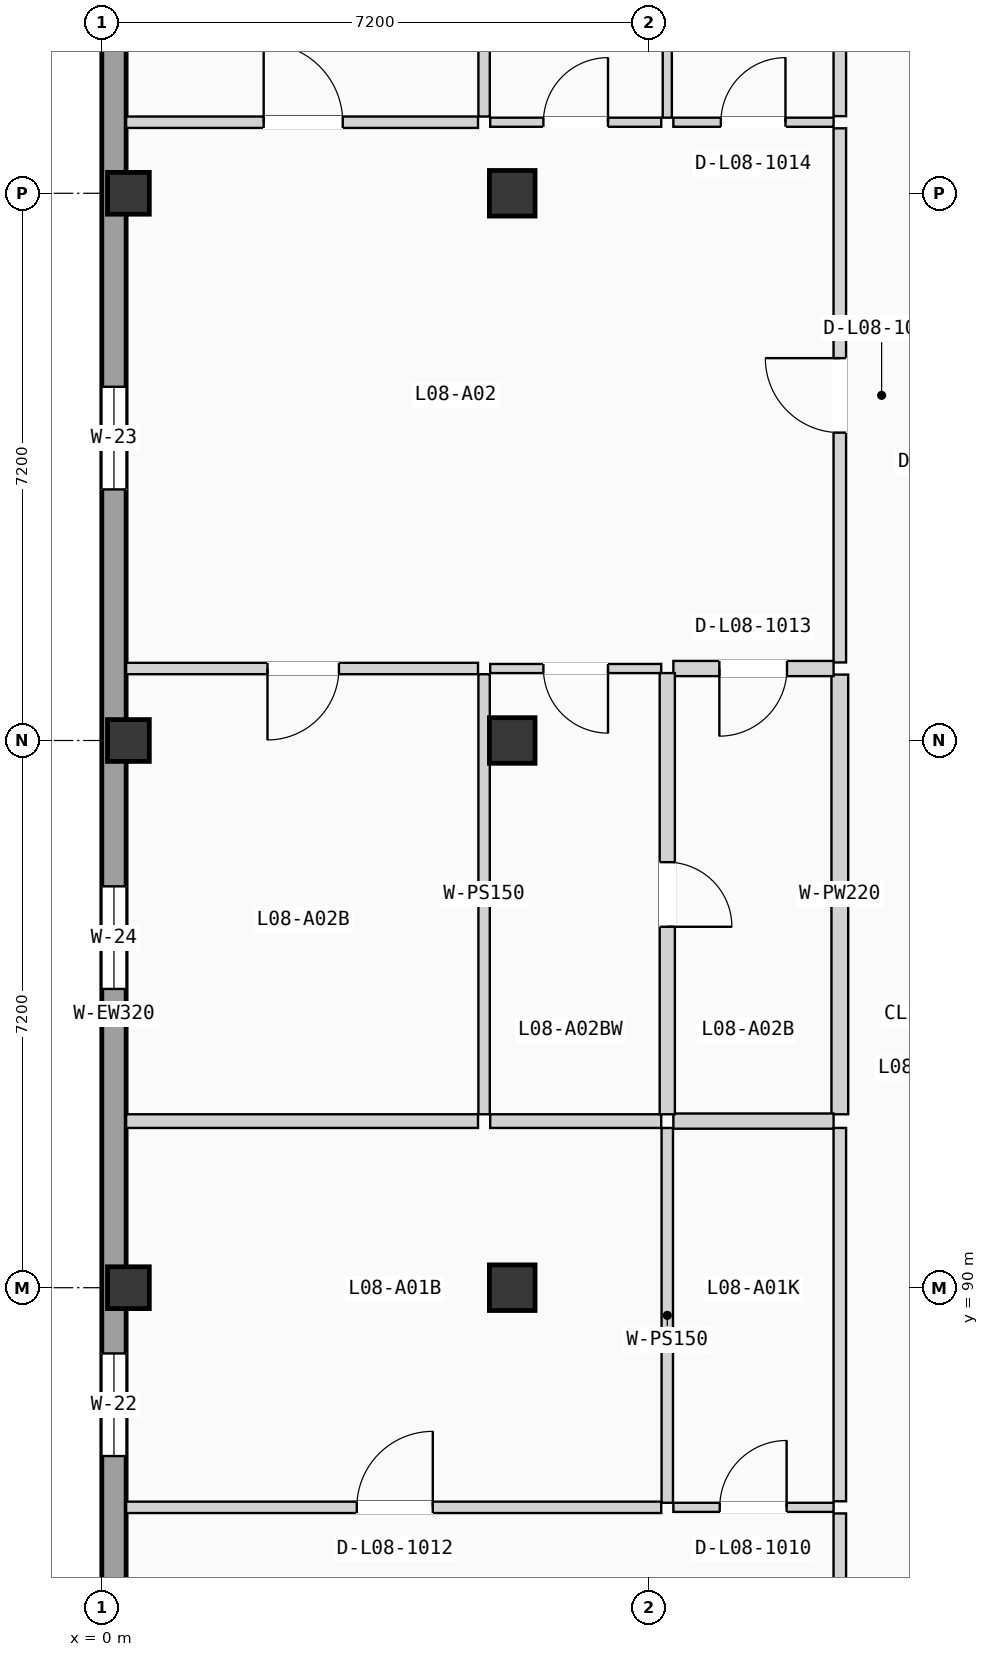
"""IFC4 building model, lengths in metres.
Left out: names, types, materials, properties, quantities, classifications, styles, units other than length and angle.
Written with IfcOpenShell. Run it as: python <this file> out.ifc"""

import sys

from ifc_helpers import new_model, si_unit, direction, frame, frame_2d, origin, origin_2d, place, context, subcontext, project, spatial, rectangle, extrude, element, fill, save


model = new_model("IFC4")
c1 = context("Model", 3, precision=1e-05, world=origin(), true_north=direction((0.0, 1.0)))
c2 = subcontext(c1, "Body", "Model", "MODEL_VIEW")
j1 = project(units=[si_unit("LENGTHUNIT", "METRE"), si_unit("PLANEANGLEUNIT", "RADIAN")], contexts=[c1])
p1 = place(None, origin())
s1 = spatial("IfcSite", under=j1, at=p1, CompositionType="ELEMENT")
p2 = place(p1, origin())
s2 = spatial("IfcBuilding", under=s1, at=p2, CompositionType="ELEMENT")
p3 = place(p2, frame((0.0, 0.0, 27.825)))
s3 = spatial("IfcBuildingStorey", under=s2, at=p3, CompositionType="ELEMENT", Elevation=27.825)
for number, where, z_axis, x_axis in (
    (1, (0.35, 90.0, 0.0), (0.0, 0.0, 1.0), (1.0, 0.0, 0.0)),
    (2, (0.35, 97.2, 0.0), (0.0, 0.0, 1.0), (1.0, 0.0, 0.0)),
    (3, (0.35, 104.4, 0.0), (0.0, 0.0, 1.0), (1.0, 0.0, 0.0)),
):
    element("IfcColumn", number, at=place(p3, frame(where, z_axis=z_axis, x_axis=x_axis)), inside=s3, PredefinedType="COLUMN", context=c2, shape_type="SweptSolid", body=[
        extrude(rectangle(XDim=0.55, YDim=0.55, at=origin_2d()), origin(), (0.0, 0.0, 1.0), 3.15),
    ])
for number, where, z_axis, x_axis in (
    (4, (5.4, 90.0, 0.0), (0.0, 0.0, 1.0), (1.0, 0.0, 0.0)),
    (5, (5.4, 97.2, 0.0), (0.0, 0.0, 1.0), (1.0, 0.0, 0.0)),
    (6, (5.4, 104.4, 0.0), (0.0, 0.0, 1.0), (1.0, 0.0, 0.0)),
):
    element("IfcColumn", number, at=place(p3, frame(where, z_axis=z_axis, x_axis=x_axis)), inside=s3, PredefinedType="COLUMN", context=c2, shape_type="SweptSolid", body=[
        extrude(rectangle(XDim=0.6, YDim=0.6, at=origin_2d()), origin(), (0.0, 0.0, 1.0), 3.15),
    ])
p4 = place(p3, frame((0.16, 68.72, 0.0), z_axis=(0.0, 0.0, 1.0), x_axis=(0.0, 1.0, 0.0)))
e7 = element("IfcWall", 7, at=p4, inside=s3, PredefinedType="SOLIDWALL", context=c2, shape_type="SweptSolid", body=[
    extrude(rectangle(XDim=49.76, YDim=0.32, at=frame_2d((24.88, 0.0))), origin(), (0.0, 0.0, 1.0), 2.89),
])
p5 = place(p4, frame((15.855, 0.0, 0.85)))
e8 = element("IfcOpeningElement", 8, at=p5, cuts=e7, PredefinedType="OPENING", context=c2, shape_type="SweptSolid", body=[
    extrude(rectangle(XDim=0.95, YDim=1.2, at=frame_2d((0.475, 0.6))), frame((0.0, 0.17, 0.0), z_axis=(0.0, -1.0, 0.0), x_axis=(1.0, 0.0, 0.0)), (0.0, 0.0, 1.0), 0.34),
])
p6 = place(p4, frame((9.061, 0.0, 0.9)))
e9 = element("IfcOpeningElement", 9, at=p6, cuts=e7, PredefinedType="OPENING", context=c2, shape_type="SweptSolid", body=[
    extrude(rectangle(XDim=1.35, YDim=1.2, at=frame_2d((0.675, 0.6))), frame((0.0, 0.17, 0.0), z_axis=(0.0, -1.0, 0.0), x_axis=(1.0, 0.0, 0.0)), (0.0, 0.0, 1.0), 0.34),
])
p7 = place(p4, frame((19.065, 0.0, 0.855)))
e10 = element("IfcOpeningElement", 10, at=p7, cuts=e7, PredefinedType="OPENING", context=c2, shape_type="SweptSolid", body=[
    extrude(rectangle(XDim=1.35, YDim=1.35, at=frame_2d((0.675, 0.675))), frame((0.0, 0.17, 0.0), z_axis=(0.0, -1.0, 0.0), x_axis=(1.0, 0.0, 0.0)), (0.0, 0.0, 1.0), 0.34),
])
p8 = place(p4, frame((31.784, 0.0, 0.705)))
e11 = element("IfcOpeningElement", 11, at=p8, cuts=e7, PredefinedType="OPENING", context=c2, shape_type="SweptSolid", body=[
    extrude(rectangle(XDim=1.35, YDim=1.5, at=frame_2d((0.675, 0.75))), frame((0.0, 0.17, 0.0), z_axis=(0.0, -1.0, 0.0), x_axis=(1.0, 0.0, 0.0)), (0.0, 0.0, 1.0), 0.34),
])
p9 = place(p4, frame((25.211, 0.0, 0.555)))
e12 = element("IfcOpeningElement", 12, at=p9, cuts=e7, PredefinedType="OPENING", context=c2, shape_type="SweptSolid", body=[
    extrude(rectangle(XDim=1.35, YDim=1.65, at=frame_2d((0.675, 0.825))), frame((0.0, 0.17, 0.0), z_axis=(0.0, -1.0, 0.0), x_axis=(1.0, 0.0, 0.0)), (0.0, 0.0, 1.0), 0.34),
])
p10 = place(p4, frame((39.113, 0.0, 0.85)))
e13 = element("IfcOpeningElement", 13, at=p10, cuts=e7, PredefinedType="OPENING", context=c2, shape_type="SweptSolid", body=[
    extrude(rectangle(XDim=0.95, YDim=1.2, at=frame_2d((0.475, 0.6))), frame((0.0, 0.17, 0.0), z_axis=(0.0, -1.0, 0.0), x_axis=(1.0, 0.0, 0.0)), (0.0, 0.0, 1.0), 0.34),
])
p11 = place(p3, frame((9.71, 81.072, 0.0), z_axis=(0.0, 0.0, 1.0), x_axis=(0.0, 1.0, 0.0)))
e14 = element("IfcWall", 14, at=p11, inside=s3, PredefinedType="PARTITIONING", context=c2, shape_type="SweptSolid", body=[
    extrude(rectangle(XDim=5.958, YDim=0.165, at=frame_2d((2.979, 0.0))), origin(), (0.0, 0.0, 1.0), 2.87),
])
p12 = place(p11, frame((2.489, 0.0, 0.0)))
e15 = element("IfcOpeningElement", 15, at=p12, cuts=e14, PredefinedType="OPENING", context=c2, shape_type="SweptSolid", body=[
    extrude(rectangle(XDim=0.98, YDim=2.08, at=frame_2d((0.49, 1.04))), frame((0.0, 0.093, 0.0), z_axis=(0.0, -1.0, 0.0), x_axis=(1.0, 0.0, 0.0)), (0.0, 0.0, 1.0), 0.185),
])
p13 = place(p3, frame((9.71, 87.19, 0.0), z_axis=(0.0, 0.0, 1.0), x_axis=(0.0, 1.0, 0.0)))
e16 = element("IfcWall", 16, at=p13, inside=s3, PredefinedType="PARTITIONING", context=c2, shape_type="SweptSolid", body=[
    extrude(rectangle(XDim=4.912, YDim=0.165, at=frame_2d((2.456, 0.0))), origin(), (0.0, 0.0, 1.0), 2.87),
])
p14 = place(p3, frame((9.71, 98.227, 0.0), z_axis=(0.0, 0.0, 1.0), x_axis=(0.0, 1.0, 0.0)))
e17 = element("IfcWall", 17, at=p14, inside=s3, PredefinedType="PARTITIONING", context=c2, shape_type="SweptSolid", body=[
    extrude(rectangle(XDim=7.028, YDim=0.165, at=frame_2d((3.514, 0.0))), origin(), (0.0, 0.0, 1.0), 2.87),
])
p15 = place(p14, frame((3.024, 0.0, 0.0)))
e18 = element("IfcOpeningElement", 18, at=p15, cuts=e17, PredefinedType="OPENING", context=c2, shape_type="SweptSolid", body=[
    extrude(rectangle(XDim=0.98, YDim=2.08, at=frame_2d((0.49, 1.04))), frame((0.0, 0.093, 0.0), z_axis=(0.0, -1.0, 0.0), x_axis=(1.0, 0.0, 0.0)), (0.0, 0.0, 1.0), 0.185),
])
p16 = place(p3, frame((9.71, 92.282, 0.0), z_axis=(0.0, 0.0, 1.0), x_axis=(0.0, 1.0, 0.0)))
e19 = element("IfcWall", 19, at=p16, inside=s3, PredefinedType="PLUMBINGWALL", context=c2, shape_type="SweptSolid", body=[
    extrude(rectangle(XDim=5.785, YDim=0.22, at=frame_2d((2.893, 0.0))), origin(), (0.0, 0.0, 1.0), 2.87),
])
p17 = place(p3, frame((9.71, 105.415, 0.0), z_axis=(0.0, 0.0, 1.0), x_axis=(0.0, 1.0, 0.0)))
e20 = element("IfcWall", 20, at=p17, inside=s3, PredefinedType="PARTITIONING", context=c2, shape_type="SweptSolid", body=[
    extrude(rectangle(XDim=5.785, YDim=0.165, at=frame_2d((2.893, 0.0))), origin(), (0.0, 0.0, 1.0), 2.87),
])
p18 = place(p3, frame((7.52, 87.11, 0.0), z_axis=(0.0, 0.0, 1.0), x_axis=(1.0, 0.0, 0.0)))
e21 = element("IfcWall", 21, at=p18, inside=s3, PredefinedType="PARTITIONING", context=c2, shape_type="SweptSolid", body=[
    extrude(rectangle(XDim=2.108, YDim=0.12, at=frame_2d((1.054, 0.0))), origin(), (0.0, 0.0, 1.0), 2.87),
])
p19 = place(p18, frame((0.61, 0.0, 0.0)))
e22 = element("IfcOpeningElement", 22, at=p19, cuts=e21, PredefinedType="OPENING", context=c2, shape_type="SweptSolid", body=[
    extrude(rectangle(XDim=0.88, YDim=2.02, at=frame_2d((0.44, 1.01))), frame((0.0, 0.07, 0.0), z_axis=(0.0, -1.0, 0.0), x_axis=(1.0, 0.0, 0.0)), (0.0, 0.0, 1.0), 0.14),
])
p20 = place(p3, frame((0.32, 87.11, 0.0), z_axis=(0.0, 0.0, 1.0), x_axis=(1.0, 0.0, 0.0)))
e23 = element("IfcWall", 23, at=p20, inside=s3, PredefinedType="PARTITIONING", context=c2, shape_type="SweptSolid", body=[
    extrude(rectangle(XDim=7.04, YDim=0.15, at=frame_2d((3.52, 0.0))), origin(), (0.0, 0.0, 1.0), 2.87),
])
p21 = place(p20, frame((3.035, 0.0, 0.0)))
e24 = element("IfcOpeningElement", 24, at=p21, cuts=e23, PredefinedType="OPENING", context=c2, shape_type="SweptSolid", body=[
    extrude(rectangle(XDim=1.0, YDim=2.06, at=frame_2d((0.5, 1.03))), frame((0.0, 0.085, 0.0), z_axis=(0.0, -1.0, 0.0), x_axis=(1.0, 0.0, 0.0)), (0.0, 0.0, 1.0), 0.17),
])
p22 = place(p3, frame((7.44, 87.17, 0.0), z_axis=(0.0, 0.0, 1.0), x_axis=(0.0, 1.0, 0.0)))
e25 = element("IfcWall", 25, at=p22, inside=s3, PredefinedType="PARTITIONING", context=c2, shape_type="SweptSolid", body=[
    extrude(rectangle(XDim=4.932, YDim=0.15, at=frame_2d((2.466, 0.0))), origin(), (0.0, 0.0, 1.0), 2.87),
])
p23 = place(p3, frame((7.52, 92.192, 0.0), z_axis=(0.0, 0.0, 1.0), x_axis=(1.0, 0.0, 0.0)))
e26 = element("IfcWall", 26, at=p23, inside=s3, PredefinedType="PLUMBINGWALL", context=c2, shape_type="SweptSolid", body=[
    extrude(rectangle(XDim=2.108, YDim=0.2, at=frame_2d((1.054, 0.0))), origin(), (0.0, 0.0, 1.0), 2.87),
])
p24 = place(p3, frame((0.32, 92.192, 0.0), z_axis=(0.0, 0.0, 1.0), x_axis=(1.0, 0.0, 0.0)))
e27 = element("IfcWall", 27, at=p24, inside=s3, PredefinedType="PARTITIONING", context=c2, shape_type="SweptSolid", body=[
    extrude(rectangle(XDim=4.63, YDim=0.18, at=frame_2d((2.315, 0.0))), origin(), (0.0, 0.0, 1.0), 2.87),
])
p25 = place(p3, frame((5.11, 92.192, 0.0), z_axis=(0.0, 0.0, 1.0), x_axis=(1.0, 0.0, 0.0)))
e28 = element("IfcWall", 28, at=p25, inside=s3, PredefinedType="PARTITIONING", context=c2, shape_type="SweptSolid", body=[
    extrude(rectangle(XDim=2.25, YDim=0.18, at=frame_2d((1.125, 0.0))), origin(), (0.0, 0.0, 1.0), 2.87),
])
p26 = place(p3, frame((7.52, 98.147, 0.0), z_axis=(0.0, 0.0, 1.0), x_axis=(1.0, 0.0, 0.0)))
e29 = element("IfcWall", 29, at=p26, inside=s3, PredefinedType="PLUMBINGWALL", context=c2, shape_type="SweptSolid", body=[
    extrude(rectangle(XDim=2.108, YDim=0.2, at=frame_2d((1.054, 0.0))), origin(), (0.0, 0.0, 1.0), 2.87),
])
p27 = place(p26, frame((0.605, 0.0, 0.0)))
e30 = element("IfcOpeningElement", 30, at=p27, cuts=e29, PredefinedType="OPENING", context=c2, shape_type="SweptSolid", body=[
    extrude(rectangle(XDim=0.89, YDim=2.03, at=frame_2d((0.445, 1.015))), frame((0.0, 0.11, 0.0), z_axis=(0.0, -1.0, 0.0), x_axis=(1.0, 0.0, 0.0)), (0.0, 0.0, 1.0), 0.22),
])
p28 = place(p3, frame((7.52, 105.335, 0.0), z_axis=(0.0, 0.0, 1.0), x_axis=(1.0, 0.0, 0.0)))
e31 = element("IfcWall", 31, at=p28, inside=s3, PredefinedType="PARTITIONING", context=c2, shape_type="SweptSolid", body=[
    extrude(rectangle(XDim=2.108, YDim=0.12, at=frame_2d((1.054, 0.0))), origin(), (0.0, 0.0, 1.0), 2.87),
])
p29 = place(p28, frame((0.625, 0.0, 0.0)))
e32 = element("IfcOpeningElement", 32, at=p29, cuts=e31, PredefinedType="OPENING", context=c2, shape_type="SweptSolid", body=[
    extrude(rectangle(XDim=0.85, YDim=2.01, at=frame_2d((0.425, 1.005))), frame((0.0, 0.07, 0.0), z_axis=(0.0, -1.0, 0.0), x_axis=(1.0, 0.0, 0.0)), (0.0, 0.0, 1.0), 0.14),
])
p30 = place(p3, frame((0.32, 98.147, 0.0), z_axis=(0.0, 0.0, 1.0), x_axis=(1.0, 0.0, 0.0)))
e33 = element("IfcWall", 33, at=p30, inside=s3, PredefinedType="PARTITIONING", context=c2, shape_type="SweptSolid", body=[
    extrude(rectangle(XDim=4.63, YDim=0.15, at=frame_2d((2.315, 0.0))), origin(), (0.0, 0.0, 1.0), 2.87),
])
p31 = place(p30, frame((1.86, 0.0, 0.0)))
e34 = element("IfcOpeningElement", 34, at=p31, cuts=e33, PredefinedType="OPENING", context=c2, shape_type="SweptSolid", body=[
    extrude(rectangle(XDim=0.94, YDim=2.06, at=frame_2d((0.47, 1.03))), frame((0.0, 0.085, 0.0), z_axis=(0.0, -1.0, 0.0), x_axis=(1.0, 0.0, 0.0)), (0.0, 0.0, 1.0), 0.17),
])
p32 = place(p3, frame((5.11, 98.147, 0.0), z_axis=(0.0, 0.0, 1.0), x_axis=(1.0, 0.0, 0.0)))
e35 = element("IfcWall", 35, at=p32, inside=s3, PredefinedType="PARTITIONING", context=c2, shape_type="SweptSolid", body=[
    extrude(rectangle(XDim=2.25, YDim=0.12, at=frame_2d((1.125, 0.0))), origin(), (0.0, 0.0, 1.0), 2.87),
])
p33 = place(p32, frame((0.7, 0.0, 0.0)))
e36 = element("IfcOpeningElement", 36, at=p33, cuts=e35, PredefinedType="OPENING", context=c2, shape_type="SweptSolid", body=[
    extrude(rectangle(XDim=0.85, YDim=2.01, at=frame_2d((0.425, 1.005))), frame((0.0, 0.07, 0.0), z_axis=(0.0, -1.0, 0.0), x_axis=(1.0, 0.0, 0.0)), (0.0, 0.0, 1.0), 0.14),
])
p34 = place(p3, frame((0.32, 105.335, 0.0), z_axis=(0.0, 0.0, 1.0), x_axis=(1.0, 0.0, 0.0)))
e37 = element("IfcWall", 37, at=p34, inside=s3, PredefinedType="PARTITIONING", context=c2, shape_type="SweptSolid", body=[
    extrude(rectangle(XDim=4.63, YDim=0.15, at=frame_2d((2.315, 0.0))), origin(), (0.0, 0.0, 1.0), 2.87),
])
p35 = place(p34, frame((1.81, 0.0, 0.0)))
e38 = element("IfcOpeningElement", 38, at=p35, cuts=e37, PredefinedType="OPENING", context=c2, shape_type="SweptSolid", body=[
    extrude(rectangle(XDim=1.04, YDim=2.08, at=frame_2d((0.52, 1.04))), frame((0.0, 0.085, 0.0), z_axis=(0.0, -1.0, 0.0), x_axis=(1.0, 0.0, 0.0)), (0.0, 0.0, 1.0), 0.17),
])
p36 = place(p3, frame((5.11, 105.335, 0.0), z_axis=(0.0, 0.0, 1.0), x_axis=(1.0, 0.0, 0.0)))
e39 = element("IfcWall", 39, at=p36, inside=s3, PredefinedType="PARTITIONING", context=c2, shape_type="SweptSolid", body=[
    extrude(rectangle(XDim=2.25, YDim=0.12, at=frame_2d((1.125, 0.0))), origin(), (0.0, 0.0, 1.0), 2.87),
])
p37 = place(p36, frame((0.7, 0.0, 0.0)))
e40 = element("IfcOpeningElement", 40, at=p37, cuts=e39, PredefinedType="OPENING", context=c2, shape_type="SweptSolid", body=[
    extrude(rectangle(XDim=0.85, YDim=2.01, at=frame_2d((0.425, 1.005))), frame((0.0, 0.07, 0.0), z_axis=(0.0, -1.0, 0.0), x_axis=(1.0, 0.0, 0.0)), (0.0, 0.0, 1.0), 0.14),
])
p38 = place(p3, frame((7.44, 92.282, 0.0), z_axis=(0.0, 0.0, 1.0), x_axis=(0.0, 1.0, 0.0)))
e41 = element("IfcWall", 41, at=p38, inside=s3, PredefinedType="PLUMBINGWALL", context=c2, shape_type="SweptSolid", body=[
    extrude(rectangle(XDim=5.805, YDim=0.2, at=frame_2d((2.902, 0.0))), origin(), (0.0, 0.0, 1.0), 2.87),
])
p39 = place(p38, frame((2.467, 0.0, 0.0)))
e42 = element("IfcOpeningElement", 42, at=p39, cuts=e41, PredefinedType="OPENING", context=c2, shape_type="SweptSolid", body=[
    extrude(rectangle(XDim=0.85, YDim=2.01, at=frame_2d((0.425, 1.005))), frame((0.0, 0.11, 0.0), z_axis=(0.0, -1.0, 0.0), x_axis=(1.0, 0.0, 0.0)), (0.0, 0.0, 1.0), 0.22),
])
p40 = place(p3, frame((7.44, 105.395, 0.0), z_axis=(0.0, 0.0, 1.0), x_axis=(0.0, 1.0, 0.0)))
e43 = element("IfcWall", 43, at=p40, inside=s3, PredefinedType="PARTITIONING", context=c2, shape_type="SweptSolid", body=[
    extrude(rectangle(XDim=5.805, YDim=0.12, at=frame_2d((2.902, 0.0))), origin(), (0.0, 0.0, 1.0), 2.87),
])
for number, where, z_axis, x_axis in (
    (44, (5.03, 92.282, 0.0), (0.0, 0.0, 1.0), (0.0, 1.0, 0.0)),
    (45, (5.03, 105.41, 0.0), (0.0, 0.0, 1.0), (0.0, 1.0, 0.0)),
):
    element("IfcWall", number, at=place(p3, frame(where, z_axis=z_axis, x_axis=x_axis)), inside=s3, PredefinedType="PARTITIONING", context=c2, shape_type="SweptSolid", body=[
        extrude(rectangle(XDim=5.79, YDim=0.15, at=frame_2d((2.895, 0.0))), origin(), (0.0, 0.0, 1.0), 2.87),
    ])
p41 = place(p7, origin())
e46 = element("IfcWindow", 46, at=p41, inside=s3, PartitioningType="SINGLE_PANEL", PredefinedType="WINDOW", context=c2, shape_type="SweptSolid", body=[
    extrude(rectangle(XDim=1.35, YDim=1.35, at=frame_2d((0.675, 0.675))), frame((0.0, 0.03, 0.0), z_axis=(0.0, -1.0, 0.0), x_axis=(1.0, 0.0, 0.0)), (0.0, 0.0, 1.0), 0.06),
])
fill(e10, e46)
p42 = place(p8, origin())
e47 = element("IfcWindow", 47, at=p42, inside=s3, PartitioningType="SINGLE_PANEL", PredefinedType="WINDOW", context=c2, shape_type="SweptSolid", body=[
    extrude(rectangle(XDim=1.35, YDim=1.5, at=frame_2d((0.675, 0.75))), frame((0.0, 0.03, 0.0), z_axis=(0.0, -1.0, 0.0), x_axis=(1.0, 0.0, 0.0)), (0.0, 0.0, 1.0), 0.06),
])
fill(e11, e47)
p43 = place(p9, origin())
e48 = element("IfcWindow", 48, at=p43, inside=s3, PartitioningType="SINGLE_PANEL", PredefinedType="WINDOW", context=c2, shape_type="SweptSolid", body=[
    extrude(rectangle(XDim=1.35, YDim=1.65, at=frame_2d((0.675, 0.825))), frame((0.0, 0.03, 0.0), z_axis=(0.0, -1.0, 0.0), x_axis=(1.0, 0.0, 0.0)), (0.0, 0.0, 1.0), 0.06),
])
fill(e12, e48)
p44 = place(p15, origin())
e49 = element("IfcDoor", 49, at=p44, inside=s3, OperationType="SINGLE_SWING_RIGHT", PredefinedType="DOOR", context=c2, shape_type="SweptSolid", body=[
    extrude(rectangle(XDim=0.98, YDim=2.08, at=frame_2d((0.49, 1.04))), frame((0.0, 0.025, 0.0), z_axis=(0.0, -1.0, 0.0), x_axis=(1.0, 0.0, 0.0)), (0.0, 0.0, 1.0), 0.05),
])
fill(e18, e49)
p45 = place(p19, origin())
e50 = element("IfcDoor", 50, at=p45, inside=s3, OperationType="SINGLE_SWING_RIGHT", PredefinedType="DOOR", context=c2, shape_type="SweptSolid", body=[
    extrude(rectangle(XDim=0.88, YDim=2.02, at=frame_2d((0.44, 1.01))), frame((0.0, 0.025, 0.0), z_axis=(0.0, -1.0, 0.0), x_axis=(1.0, 0.0, 0.0)), (0.0, 0.0, 1.0), 0.05),
])
fill(e22, e50)
p46 = place(p21, origin())
e51 = element("IfcDoor", 51, at=p46, inside=s3, OperationType="SINGLE_SWING_RIGHT", PredefinedType="DOOR", context=c2, shape_type="SweptSolid", body=[
    extrude(rectangle(XDim=1.0, YDim=2.06, at=frame_2d((0.5, 1.03))), frame((0.0, 0.025, 0.0), z_axis=(0.0, -1.0, 0.0), x_axis=(1.0, 0.0, 0.0)), (0.0, 0.0, 1.0), 0.05),
])
fill(e24, e51)
p47 = place(p27, frame((0.89, 0.0, 0.0), z_axis=(0.0, 0.0, 1.0), x_axis=(-1.0, 0.0, 0.0)))
e52 = element("IfcDoor", 52, at=p47, inside=s3, OperationType="SINGLE_SWING_LEFT", PredefinedType="DOOR", context=c2, shape_type="SweptSolid", body=[
    extrude(rectangle(XDim=0.89, YDim=2.03, at=frame_2d((0.445, 1.015))), frame((0.0, 0.025, 0.0), z_axis=(0.0, -1.0, 0.0), x_axis=(1.0, 0.0, 0.0)), (0.0, 0.0, 1.0), 0.05),
])
fill(e30, e52)
p48 = place(p29, origin())
e53 = element("IfcDoor", 53, at=p48, inside=s3, OperationType="SINGLE_SWING_RIGHT", PredefinedType="DOOR", context=c2, shape_type="SweptSolid", body=[
    extrude(rectangle(XDim=0.85, YDim=2.01, at=frame_2d((0.425, 1.005))), frame((0.0, 0.025, 0.0), z_axis=(0.0, -1.0, 0.0), x_axis=(1.0, 0.0, 0.0)), (0.0, 0.0, 1.0), 0.05),
])
fill(e32, e53)
p49 = place(p31, frame((0.94, 0.0, 0.0), z_axis=(0.0, 0.0, 1.0), x_axis=(-1.0, 0.0, 0.0)))
e54 = element("IfcDoor", 54, at=p49, inside=s3, OperationType="SINGLE_SWING_LEFT", PredefinedType="DOOR", context=c2, shape_type="SweptSolid", body=[
    extrude(rectangle(XDim=0.94, YDim=2.06, at=frame_2d((0.47, 1.03))), frame((0.0, 0.025, 0.0), z_axis=(0.0, -1.0, 0.0), x_axis=(1.0, 0.0, 0.0)), (0.0, 0.0, 1.0), 0.05),
])
fill(e34, e54)
p50 = place(p33, frame((0.85, 0.0, 0.0), z_axis=(0.0, 0.0, 1.0), x_axis=(-1.0, 0.0, 0.0)))
e55 = element("IfcDoor", 55, at=p50, inside=s3, OperationType="SINGLE_SWING_RIGHT", PredefinedType="DOOR", context=c2, shape_type="SweptSolid", body=[
    extrude(rectangle(XDim=0.85, YDim=2.01, at=frame_2d((0.425, 1.005))), frame((0.0, 0.025, 0.0), z_axis=(0.0, -1.0, 0.0), x_axis=(1.0, 0.0, 0.0)), (0.0, 0.0, 1.0), 0.05),
])
fill(e36, e55)
p51 = place(p35, origin())
e56 = element("IfcDoor", 56, at=p51, inside=s3, OperationType="SINGLE_SWING_LEFT", PredefinedType="DOOR", context=c2, shape_type="SweptSolid", body=[
    extrude(rectangle(XDim=1.04, YDim=2.08, at=frame_2d((0.52, 1.04))), frame((0.0, 0.025, 0.0), z_axis=(0.0, -1.0, 0.0), x_axis=(1.0, 0.0, 0.0)), (0.0, 0.0, 1.0), 0.05),
])
fill(e38, e56)
p52 = place(p37, origin())
e57 = element("IfcDoor", 57, at=p52, inside=s3, OperationType="SINGLE_SWING_RIGHT", PredefinedType="DOOR", context=c2, shape_type="SweptSolid", body=[
    extrude(rectangle(XDim=0.85, YDim=2.01, at=frame_2d((0.425, 1.005))), frame((0.0, 0.025, 0.0), z_axis=(0.0, -1.0, 0.0), x_axis=(1.0, 0.0, 0.0)), (0.0, 0.0, 1.0), 0.05),
])
fill(e40, e57)
p53 = place(p39, frame((0.85, 0.0, 0.0), z_axis=(0.0, 0.0, 1.0), x_axis=(-1.0, 0.0, 0.0)))
e58 = element("IfcDoor", 58, at=p53, inside=s3, OperationType="SINGLE_SWING_LEFT", PredefinedType="DOOR", context=c2, shape_type="SweptSolid", body=[
    extrude(rectangle(XDim=0.85, YDim=2.01, at=frame_2d((0.425, 1.005))), frame((0.0, 0.025, 0.0), z_axis=(0.0, -1.0, 0.0), x_axis=(1.0, 0.0, 0.0)), (0.0, 0.0, 1.0), 0.05),
])
fill(e42, e58)
save(model, sys.argv[1])
